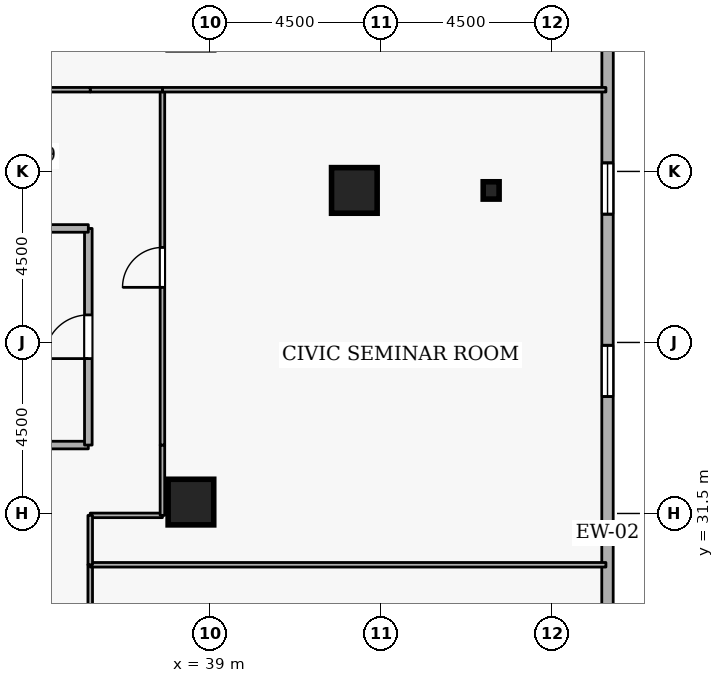
"""IFC4 building model, lengths in metres.
Left out: names, types, materials, properties, quantities, classifications, styles, units other than length and angle.
Written with IfcOpenShell. Run it as: python <this file> out.ifc"""

import sys

from ifc_helpers import new_model, si_unit, direction, frame, frame_2d, origin, origin_2d, place, context, subcontext, project, spatial, rectangle, i_section, extrude, element, fill, save


model = new_model("IFC4")
c1 = context("Model", 3, precision=1e-05, world=origin(), true_north=direction((0.0, 1.0)))
c2 = subcontext(c1, "Body", "Model", "MODEL_VIEW")
j1 = project(units=[si_unit("LENGTHUNIT", "METRE"), si_unit("PLANEANGLEUNIT", "RADIAN")], contexts=[c1])
p1 = place(None, origin())
s1 = spatial("IfcSite", under=j1, at=p1, CompositionType="ELEMENT")
p2 = place(p1, origin())
s2 = spatial("IfcBuilding", under=s1, at=p2, CompositionType="ELEMENT")
p3 = place(p2, frame((0.0, 0.0, 94.5)))
s3 = spatial("IfcBuildingStorey", under=s2, at=p3, CompositionType="ELEMENT", Elevation=94.5)
for number, where, z_axis, x_axis in (
    (1, (42.8, 40.0, 0.0), (0.0, 0.0, 1.0), (1.0, 0.0, 0.0)),
    (2, (38.5, 31.8, 0.0), (0.0, 0.0, 1.0), (1.0, 0.0, 0.0)),
):
    element("IfcColumn", number, at=place(p3, frame(where, z_axis=z_axis, x_axis=x_axis)), inside=s3, PredefinedType="COLUMN", context=c2, shape_type="SweptSolid", body=[
        extrude(rectangle(XDim=1.2, YDim=1.2, at=origin_2d()), origin(), (0.0, 0.0, 1.0), 3.6),
    ])
p4 = place(p3, frame((46.4, 40.0, 0.0), z_axis=(0.0, 0.0, 1.0), x_axis=(1.0, 0.0, 0.0)))
e3 = element("IfcColumn", 3, at=p4, inside=s3, PredefinedType="COLUMN", context=c2, shape_type="SweptSolid", body=[
    extrude(i_section(OverallWidth=0.418, OverallDepth=0.456, WebThickness=0.042, FlangeThickness=0.067, FilletRadius=0.015, at=origin_2d()), origin(), (0.0, 0.0, 1.0), 3.6),
])
p5 = place(p3, frame((49.458, 13.575, 0.0), z_axis=(0.0, 0.0, 1.0), x_axis=(0.000182370391, 0.999999983371, 0.0)))
e4 = element("IfcWall", 4, at=p5, inside=s3, PredefinedType="STANDARD", context=c2, shape_type="SweptSolid", body=[
    extrude(rectangle(XDim=34.806, YDim=0.3, at=frame_2d((17.403, 0.0))), origin(), (0.0, 0.0, 1.0), 2.22),
])
p6 = place(p5, frame((1.8, 0.0, 0.72)))
e5 = element("IfcOpeningElement", 5, at=p6, cuts=e4, PredefinedType="OPENING", context=c2, shape_type="SweptSolid", body=[
    extrude(rectangle(XDim=1.35, YDim=1.05, at=frame_2d((0.675, 0.525))), frame((0.0, 0.16, 0.0), z_axis=(0.0, -1.0, 0.0), x_axis=(1.0, 0.0, 0.0)), (0.0, 0.0, 1.0), 0.32),
])
p7 = place(p5, frame((6.6, 0.0, 0.72)))
e6 = element("IfcOpeningElement", 6, at=p7, cuts=e4, PredefinedType="OPENING", context=c2, shape_type="SweptSolid", body=[
    extrude(rectangle(XDim=1.35, YDim=1.05, at=frame_2d((0.675, 0.525))), frame((0.0, 0.16, 0.0), z_axis=(0.0, -1.0, 0.0), x_axis=(1.0, 0.0, 0.0)), (0.0, 0.0, 1.0), 0.32),
])
p8 = place(p5, frame((11.4, 0.0, 0.72)))
e7 = element("IfcOpeningElement", 7, at=p8, cuts=e4, PredefinedType="OPENING", context=c2, shape_type="SweptSolid", body=[
    extrude(rectangle(XDim=1.35, YDim=1.05, at=frame_2d((0.675, 0.525))), frame((0.0, 0.16, 0.0), z_axis=(0.0, -1.0, 0.0), x_axis=(1.0, 0.0, 0.0)), (0.0, 0.0, 1.0), 0.32),
])
p9 = place(p5, frame((21.0, 0.0, 0.72)))
e8 = element("IfcOpeningElement", 8, at=p9, cuts=e4, PredefinedType="OPENING", context=c2, shape_type="SweptSolid", body=[
    extrude(rectangle(XDim=1.35, YDim=1.05, at=frame_2d((0.675, 0.525))), frame((0.0, 0.16, 0.0), z_axis=(0.0, -1.0, 0.0), x_axis=(1.0, 0.0, 0.0)), (0.0, 0.0, 1.0), 0.32),
])
p10 = place(p5, frame((25.8, 0.0, 0.72)))
e9 = element("IfcOpeningElement", 9, at=p10, cuts=e4, PredefinedType="OPENING", context=c2, shape_type="SweptSolid", body=[
    extrude(rectangle(XDim=1.35, YDim=1.05, at=frame_2d((0.675, 0.525))), frame((0.0, 0.16, 0.0), z_axis=(0.0, -1.0, 0.0), x_axis=(1.0, 0.0, 0.0)), (0.0, 0.0, 1.0), 0.32),
])
p11 = place(p5, frame((30.6, 0.0, 0.72)))
e10 = element("IfcOpeningElement", 10, at=p11, cuts=e4, PredefinedType="OPENING", context=c2, shape_type="SweptSolid", body=[
    extrude(rectangle(XDim=1.35, YDim=1.05, at=frame_2d((0.675, 0.525))), frame((0.0, 0.16, 0.0), z_axis=(0.0, -1.0, 0.0), x_axis=(1.0, 0.0, 0.0)), (0.0, 0.0, 1.0), 0.32),
])
p12 = place(p3, frame((33.3, 33.3, 0.0), z_axis=(0.0, 0.0, 1.0), x_axis=(1.0, 0.0, 0.0)))
e11 = element("IfcWall", 11, at=p12, inside=s3, PredefinedType="STANDARD", context=c2, shape_type="SweptSolid", body=[
    extrude(rectangle(XDim=2.5, YDim=0.2, at=frame_2d((1.25, 0.0))), origin(), (0.0, 0.0, 1.0), 3.3),
])
p13 = place(p3, frame((35.8, 33.3, 0.0), z_axis=(0.0, 0.0, 1.0), x_axis=(0.0, 1.0, 0.0)))
e12 = element("IfcWall", 12, at=p13, inside=s3, PredefinedType="STANDARD", context=c2, shape_type="SweptSolid", body=[
    extrude(rectangle(XDim=5.7, YDim=0.2, at=frame_2d((2.85, 0.0))), origin(), (0.0, 0.0, 1.0), 3.3),
])
p14 = place(p13, frame((2.275, 0.0, 0.0)))
e13 = element("IfcOpeningElement", 13, at=p14, cuts=e12, PredefinedType="OPENING", context=c2, shape_type="SweptSolid", body=[
    extrude(rectangle(XDim=1.15, YDim=2.1, at=frame_2d((0.575, 1.05))), frame((0.0, 0.11, 0.0), z_axis=(0.0, -1.0, 0.0), x_axis=(1.0, 0.0, 0.0)), (0.0, 0.0, 1.0), 0.22),
])
p15 = place(p3, frame((35.8, 39.0, 0.0), z_axis=(0.0, 0.0, 1.0), x_axis=(-1.0, 0.0, 0.0)))
e14 = element("IfcWall", 14, at=p15, inside=s3, PredefinedType="STANDARD", context=c2, shape_type="SweptSolid", body=[
    extrude(rectangle(XDim=2.5, YDim=0.2, at=frame_2d((1.25, 0.0))), origin(), (0.0, 0.0, 1.0), 3.3),
])
p16 = place(p3, frame((35.85, 27.0, 0.0), z_axis=(0.0, 0.0, 1.0), x_axis=(0.0, 1.0, 0.0)))
e15 = element("IfcWall", 15, at=p16, inside=s3, PredefinedType="PARTITIONING", context=c2, shape_type="SweptSolid", body=[
    extrude(rectangle(XDim=3.15, YDim=0.12, at=frame_2d((1.575, 0.0))), origin(), (0.0, 0.0, 1.0), 3.3),
])
p17 = place(p16, frame((1.1, 0.0, 0.0)))
e16 = element("IfcOpeningElement", 16, at=p17, cuts=e15, PredefinedType="OPENING", context=c2, shape_type="SweptSolid", body=[
    extrude(rectangle(XDim=0.95, YDim=2.1, at=frame_2d((0.475, 1.05))), frame((0.0, 0.07, 0.0), z_axis=(0.0, -1.0, 0.0), x_axis=(1.0, 0.0, 0.0)), (0.0, 0.0, 1.0), 0.14),
])
p18 = place(p3, frame((35.85, 30.15, 0.0), z_axis=(0.0, 0.0, 1.0), x_axis=(1.0, 0.0, 0.0)))
e17 = element("IfcWall", 17, at=p18, inside=s3, PredefinedType="PARTITIONING", context=c2, shape_type="SweptSolid", body=[
    extrude(rectangle(XDim=13.57, YDim=0.12, at=frame_2d((6.785, 0.0))), origin(), (0.0, 0.0, 1.0), 3.3),
])
p19 = place(p3, frame((35.85, 31.45, 0.0), z_axis=(0.0, 0.0, 1.0), x_axis=(1.0, 0.0, 0.0)))
e18 = element("IfcWall", 18, at=p19, inside=s3, PredefinedType="PARTITIONING", context=c2, shape_type="SweptSolid", body=[
    extrude(rectangle(XDim=1.9, YDim=0.12, at=frame_2d((0.95, 0.0))), origin(), (0.0, 0.0, 1.0), 3.3),
])
p20 = place(p3, frame((37.75, 31.45, 0.0), z_axis=(0.0, 0.0, 1.0), x_axis=(0.0, 1.0, 0.0)))
e19 = element("IfcWall", 19, at=p20, inside=s3, PredefinedType="PARTITIONING", context=c2, shape_type="SweptSolid", body=[
    extrude(rectangle(XDim=1.85, YDim=0.12, at=frame_2d((0.925, 0.0))), origin(), (0.0, 0.0, 1.0), 3.3),
])
p21 = place(p3, frame((37.75, 33.3, 0.0), z_axis=(0.0, 0.0, 1.0), x_axis=(0.0, 1.0, 0.0)))
e20 = element("IfcWall", 20, at=p21, inside=s3, PredefinedType="PARTITIONING", context=c2, shape_type="SweptSolid", body=[
    extrude(rectangle(XDim=9.35, YDim=0.12, at=frame_2d((4.675, 0.0))), origin(), (0.0, 0.0, 1.0), 3.3),
])
p22 = place(p21, frame((4.15, 0.0, 0.0)))
e21 = element("IfcOpeningElement", 21, at=p22, cuts=e20, PredefinedType="OPENING", context=c2, shape_type="SweptSolid", body=[
    extrude(rectangle(XDim=1.05, YDim=2.1, at=frame_2d((0.525, 1.05))), frame((0.0, 0.07, 0.0), z_axis=(0.0, -1.0, 0.0), x_axis=(1.0, 0.0, 0.0)), (0.0, 0.0, 1.0), 0.14),
])
p23 = place(p3, frame((37.75, 42.65, 0.0), z_axis=(0.0, 0.0, 1.0), x_axis=(1.0, 0.0, 0.0)))
e22 = element("IfcWall", 22, at=p23, inside=s3, PredefinedType="PARTITIONING", context=c2, shape_type="SweptSolid", body=[
    extrude(rectangle(XDim=11.67, YDim=0.12, at=frame_2d((5.835, 0.0))), origin(), (0.0, 0.0, 1.0), 3.3),
])
p24 = place(p3, frame((35.85, 30.15, 0.0), z_axis=(0.0, 0.0, 1.0), x_axis=(0.0, 1.0, 0.0)))
e23 = element("IfcWall", 23, at=p24, inside=s3, PredefinedType="PARTITIONING", context=c2, shape_type="SweptSolid", body=[
    extrude(rectangle(XDim=1.3, YDim=0.12, at=frame_2d((0.65, 0.0))), origin(), (0.0, 0.0, 1.0), 3.3),
])
p25 = place(p3, frame((37.75, 42.65, 0.0), z_axis=(0.0, 0.0, 1.0), x_axis=(-1.0, 0.0, 0.0)))
e24 = element("IfcWall", 24, at=p25, inside=s3, PredefinedType="PARTITIONING", context=c2, shape_type="SweptSolid", body=[
    extrude(rectangle(XDim=1.9, YDim=0.12, at=frame_2d((0.95, 0.0))), origin(), (0.0, 0.0, 1.0), 2.855),
])
p26 = place(p3, frame((35.85, 42.65, 0.0), z_axis=(0.0, 0.0, 1.0), x_axis=(-1.0, 0.0, 0.0)))
e25 = element("IfcWall", 25, at=p26, inside=s3, PredefinedType="PARTITIONING", context=c2, shape_type="SweptSolid", body=[
    extrude(rectangle(XDim=4.85, YDim=0.12, at=frame_2d((2.425, 0.0))), origin(), (0.0, 0.0, 1.0), 2.855),
])
p27 = place(p26, frame((1.9, 0.0, 0.0)))
e26 = element("IfcOpeningElement", 26, at=p27, cuts=e25, PredefinedType="OPENING", context=c2, shape_type="SweptSolid", body=[
    extrude(rectangle(XDim=1.05, YDim=2.1, at=frame_2d((0.525, 1.05))), frame((0.0, 0.07, 0.0), z_axis=(0.0, -1.0, 0.0), x_axis=(1.0, 0.0, 0.0)), (0.0, 0.0, 1.0), 0.14),
])
p28 = place(p9, origin())
e27 = element("IfcWindow", 27, at=p28, inside=s3, PartitioningType="SINGLE_PANEL", PredefinedType="WINDOW", context=c2, shape_type="SweptSolid", body=[
    extrude(rectangle(XDim=1.35, YDim=1.05, at=frame_2d((0.675, 0.525))), frame((0.0, 0.03, 0.0), z_axis=(0.0, -1.0, 0.0), x_axis=(1.0, 0.0, 0.0)), (0.0, 0.0, 1.0), 0.06),
])
fill(e8, e27)
p29 = place(p10, origin())
e28 = element("IfcWindow", 28, at=p29, inside=s3, PartitioningType="SINGLE_PANEL", PredefinedType="WINDOW", context=c2, shape_type="SweptSolid", body=[
    extrude(rectangle(XDim=1.35, YDim=1.05, at=frame_2d((0.675, 0.525))), frame((0.0, 0.03, 0.0), z_axis=(0.0, -1.0, 0.0), x_axis=(1.0, 0.0, 0.0)), (0.0, 0.0, 1.0), 0.06),
])
fill(e9, e28)
p30 = place(p14, origin())
e29 = element("IfcDoor", 29, at=p30, inside=s3, OperationType="SINGLE_SWING_LEFT", PredefinedType="DOOR", context=c2, shape_type="SweptSolid", body=[
    extrude(rectangle(XDim=1.15, YDim=2.1, at=frame_2d((0.575, 1.05))), frame((0.0, 0.025, 0.0), z_axis=(0.0, -1.0, 0.0), x_axis=(1.0, 0.0, 0.0)), (0.0, 0.0, 1.0), 0.05),
])
fill(e13, e29)
p31 = place(p22, origin())
e30 = element("IfcDoor", 30, at=p31, inside=s3, OperationType="SINGLE_SWING_LEFT", PredefinedType="DOOR", context=c2, shape_type="SweptSolid", body=[
    extrude(rectangle(XDim=1.05, YDim=2.1, at=frame_2d((0.525, 1.05))), frame((0.0, 0.025, 0.0), z_axis=(0.0, -1.0, 0.0), x_axis=(1.0, 0.0, 0.0)), (0.0, 0.0, 1.0), 0.05),
])
fill(e21, e30)
save(model, sys.argv[1])
